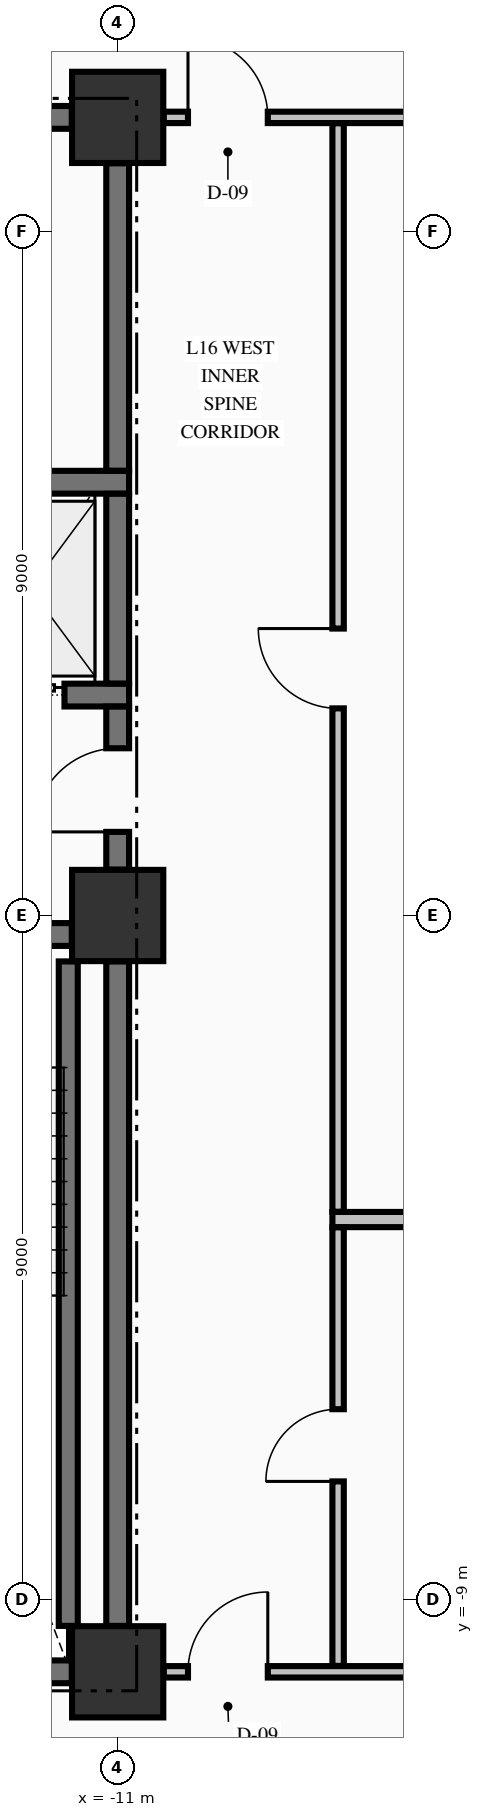
"""IFC4 building model, lengths in metres.
Left out: names, types, materials, properties, quantities, classifications, styles, units other than length and angle.
Written with IfcOpenShell. Run it as: python <this file> out.ifc"""

import sys

from ifc_helpers import new_model, si_unit, direction, frame, frame_2d, origin, origin_2d, place, context, subcontext, project, spatial, rectangle, extrude, element, fill, save


model = new_model("IFC4")
c1 = context("Model", 3, precision=1e-05, world=origin(), true_north=direction((0.0, 1.0)))
c2 = subcontext(c1, "Body", "Model", "MODEL_VIEW")
j1 = project(units=[si_unit("LENGTHUNIT", "METRE"), si_unit("PLANEANGLEUNIT", "RADIAN")], contexts=[c1])
p1 = place(None, origin())
s1 = spatial("IfcSite", under=j1, at=p1, CompositionType="ELEMENT")
p2 = place(p1, origin())
s2 = spatial("IfcBuilding", under=s1, at=p2, CompositionType="ELEMENT")
p3 = place(p2, frame((0.0, 0.0, 67.9)))
s3 = spatial("IfcBuildingStorey", under=s2, at=p3, CompositionType="ELEMENT", Elevation=67.9)
for number, where, z_axis, x_axis in (
    (1, (-11.0, -9.95, -0.25), (0.0, 0.0, 1.0), (1.0, 0.0, 0.0)),
    (2, (-11.0, 0.0, -0.25), (0.0, 0.0, 1.0), (1.0, 0.0, 0.0)),
    (3, (-11.0, 10.5, -0.25), (0.0, 0.0, 1.0), (1.0, 0.0, 0.0)),
):
    element("IfcColumn", number, at=place(p3, frame(where, z_axis=z_axis, x_axis=x_axis)), inside=s3, PredefinedType="COLUMN", context=c2, shape_type="SweptSolid", body=[
        extrude(rectangle(XDim=1.2, YDim=1.2, at=origin_2d()), origin(), (0.0, 0.0, 1.0), 3.495),
    ])
p4 = place(p3, frame((-14.7, -9.95, 0.0), z_axis=(0.0, 0.0, 1.0), x_axis=(1.0, 0.0, 0.0)))
e4 = element("IfcWall", 4, at=p4, inside=s3, PredefinedType="SHEAR", context=c2, shape_type="SweptSolid", body=[
    extrude(rectangle(XDim=3.096, YDim=0.3, at=frame_2d((1.548, 0.0))), origin(), (0.0, 0.0, 1.0), 3.245),
])
p5 = place(p3, frame((-19.396, -0.25, 0.0), z_axis=(0.0, 0.0, 1.0), x_axis=(1.0, 0.0, 0.0)))
e5 = element("IfcWall", 5, at=p5, inside=s3, PredefinedType="SHEAR", context=c2, shape_type="SweptSolid", body=[
    extrude(rectangle(XDim=7.792, YDim=0.3, at=frame_2d((3.896, 0.0))), origin(), (0.0, 0.0, 1.0), 3.245),
])
p6 = place(p5, frame((5.696, 0.0, 0.0)))
e6 = element("IfcOpeningElement", 6, at=p6, cuts=e5, PredefinedType="OPENING", context=c2, shape_type="SweptSolid", body=[
    extrude(rectangle(XDim=1.1, YDim=2.15, at=frame_2d((0.55, 1.075))), frame((0.0, 0.16, 0.0), z_axis=(0.0, -1.0, 0.0), x_axis=(1.0, 0.0, 0.0)), (0.0, 0.0, 1.0), 0.32),
])
p7 = place(p3, frame((-14.875, 2.9, 0.0), z_axis=(0.0, 0.0, 1.0), x_axis=(1.0, 0.0, 0.0)))
e7 = element("IfcWall", 7, at=p7, inside=s3, PredefinedType="SHEAR", context=c2, shape_type="SweptSolid", body=[
    extrude(rectangle(XDim=4.025, YDim=0.3, at=frame_2d((2.012, 0.0))), origin(), (0.0, 0.0, 1.0), 3.245),
])
p8 = place(p7, frame((2.075, 0.0, 0.0)))
e8 = element("IfcOpeningElement", 8, at=p8, cuts=e7, PredefinedType="OPENING", context=c2, shape_type="SweptSolid", body=[
    extrude(rectangle(XDim=1.1, YDim=2.2, at=frame_2d((0.55, 1.1))), frame((0.0, 0.16, 0.0), z_axis=(0.0, -1.0, 0.0), x_axis=(1.0, 0.0, 0.0)), (0.0, 0.0, 1.0), 0.32),
])
p9 = place(p3, frame((-14.875, 5.7, 0.0), z_axis=(0.0, 0.0, 1.0), x_axis=(1.0, 0.0, 0.0)))
e9 = element("IfcWall", 9, at=p9, inside=s3, PredefinedType="SHEAR", context=c2, shape_type="SweptSolid", body=[
    extrude(rectangle(XDim=4.025, YDim=0.3, at=frame_2d((2.012, 0.0))), origin(), (0.0, 0.0, 1.0), 3.245),
])
p10 = place(p3, frame((-14.7, 10.5, 0.0), z_axis=(0.0, 0.0, 1.0), x_axis=(1.0, 0.0, 0.0)))
e10 = element("IfcWall", 10, at=p10, inside=s3, PredefinedType="SHEAR", context=c2, shape_type="SweptSolid", body=[
    extrude(rectangle(XDim=3.096, YDim=0.3, at=frame_2d((1.548, 0.0))), origin(), (0.0, 0.0, 1.0), 3.245),
])
p11 = place(p10, frame((0.775, 0.0, 0.0)))
e11 = element("IfcOpeningElement", 11, at=p11, cuts=e10, PredefinedType="OPENING", context=c2, shape_type="SweptSolid", body=[
    extrude(rectangle(XDim=0.95, YDim=2.15, at=frame_2d((0.475, 1.075))), frame((0.0, 0.16, 0.0), z_axis=(0.0, -1.0, 0.0), x_axis=(1.0, 0.0, 0.0)), (0.0, 0.0, 1.0), 0.32),
])
p12 = place(p3, frame((-10.394, -9.95, 0.0), z_axis=(0.0, 0.0, 1.0), x_axis=(1.0, 0.0, 0.0)))
e12 = element("IfcWall", 12, at=p12, inside=s3, PredefinedType="PARTITIONING", context=c2, shape_type="SweptSolid", body=[
    extrude(rectangle(XDim=20.788, YDim=0.15, at=frame_2d((10.394, 0.0))), origin(), (0.0, 0.0, 1.0), 3.245),
])
p13 = place(p12, frame((0.319, 0.0, 0.0)))
e13 = element("IfcOpeningElement", 13, at=p13, cuts=e12, PredefinedType="OPENING", context=c2, shape_type="SweptSolid", body=[
    extrude(rectangle(XDim=1.05, YDim=2.15, at=frame_2d((0.525, 1.075))), frame((0.0, 0.085, 0.0), z_axis=(0.0, -1.0, 0.0), x_axis=(1.0, 0.0, 0.0)), (0.0, 0.0, 1.0), 0.17),
])
p14 = place(p12, frame((19.419, 0.0, 0.0)))
e14 = element("IfcOpeningElement", 14, at=p14, cuts=e12, PredefinedType="OPENING", context=c2, shape_type="SweptSolid", body=[
    extrude(rectangle(XDim=1.05, YDim=2.15, at=frame_2d((0.525, 1.075))), frame((0.0, 0.085, 0.0), z_axis=(0.0, -1.0, 0.0), x_axis=(1.0, 0.0, 0.0)), (0.0, 0.0, 1.0), 0.17),
])
p15 = place(p12, frame((13.369, 0.0, 0.0)))
e15 = element("IfcOpeningElement", 15, at=p15, cuts=e12, PredefinedType="OPENING", context=c2, shape_type="SweptSolid", body=[
    extrude(rectangle(XDim=0.95, YDim=2.15, at=frame_2d((0.475, 1.075))), frame((0.0, 0.085, 0.0), z_axis=(0.0, -1.0, 0.0), x_axis=(1.0, 0.0, 0.0)), (0.0, 0.0, 1.0), 0.17),
])
p16 = place(p3, frame((-8.175, -4.0, 0.0), z_axis=(0.0, 0.0, 1.0), x_axis=(1.0, 0.0, 0.0)))
e16 = element("IfcWall", 16, at=p16, inside=s3, PredefinedType="PARTITIONING", context=c2, shape_type="SweptSolid", body=[
    extrude(rectangle(XDim=10.075, YDim=0.2, at=frame_2d((5.038, 0.0))), origin(), (0.0, 0.0, 1.0), 3.245),
])
p17 = place(p3, frame((-10.394, 10.5, 0.0), z_axis=(0.0, 0.0, 1.0), x_axis=(1.0, 0.0, 0.0)))
e17 = element("IfcWall", 17, at=p17, inside=s3, PredefinedType="PARTITIONING", context=c2, shape_type="SweptSolid", body=[
    extrude(rectangle(XDim=20.788, YDim=0.15, at=frame_2d((10.394, 0.0))), origin(), (0.0, 0.0, 1.0), 3.245),
])
p18 = place(p17, frame((0.319, 0.0, 0.0)))
e18 = element("IfcOpeningElement", 18, at=p18, cuts=e17, PredefinedType="OPENING", context=c2, shape_type="SweptSolid", body=[
    extrude(rectangle(XDim=1.05, YDim=2.15, at=frame_2d((0.525, 1.075))), frame((0.0, 0.085, 0.0), z_axis=(0.0, -1.0, 0.0), x_axis=(1.0, 0.0, 0.0)), (0.0, 0.0, 1.0), 0.17),
])
p19 = place(p17, frame((19.419, 0.0, 0.0)))
e19 = element("IfcOpeningElement", 19, at=p19, cuts=e17, PredefinedType="OPENING", context=c2, shape_type="SweptSolid", body=[
    extrude(rectangle(XDim=1.05, YDim=2.15, at=frame_2d((0.525, 1.075))), frame((0.0, 0.085, 0.0), z_axis=(0.0, -1.0, 0.0), x_axis=(1.0, 0.0, 0.0)), (0.0, 0.0, 1.0), 0.17),
])
p20 = place(p3, frame((-11.65, -9.346, 0.0), z_axis=(0.0, 0.0, 1.0), x_axis=(0.0, 1.0, 0.0)))
e20 = element("IfcWall", 20, at=p20, inside=s3, PredefinedType="SOLIDWALL", context=c2, shape_type="SweptSolid", body=[
    extrude(rectangle(XDim=8.742, YDim=0.25, at=frame_2d((4.371, 0.0))), origin(), (0.0, 0.0, 1.0), 3.245),
])
p21 = place(p3, frame((-11.0, -9.346, 0.0), z_axis=(0.0, 0.0, 1.0), x_axis=(0.0, 1.0, 0.0)))
e21 = element("IfcWall", 21, at=p21, inside=s3, PredefinedType="SHEAR", context=c2, shape_type="SweptSolid", body=[
    extrude(rectangle(XDim=8.742, YDim=0.3, at=frame_2d((4.371, 0.0))), origin(), (0.0, 0.0, 1.0), 3.245),
])
p22 = place(p3, frame((-11.0, 0.604, 0.0), z_axis=(0.0, 0.0, 1.0), x_axis=(0.0, 1.0, 0.0)))
e22 = element("IfcWall", 22, at=p22, inside=s3, PredefinedType="SHEAR", context=c2, shape_type="SweptSolid", body=[
    extrude(rectangle(XDim=2.144, YDim=0.3, at=frame_2d((1.072, 0.0))), origin(), (0.0, 0.0, 1.0), 3.245),
])
p23 = place(p22, frame((0.496, 0.0, 0.0)))
e23 = element("IfcOpeningElement", 23, at=p23, cuts=e22, PredefinedType="OPENING", context=c2, shape_type="SweptSolid", body=[
    extrude(rectangle(XDim=1.1, YDim=2.15, at=frame_2d((0.55, 1.075))), frame((0.0, 0.16, 0.0), z_axis=(0.0, -1.0, 0.0), x_axis=(1.0, 0.0, 0.0)), (0.0, 0.0, 1.0), 0.32),
])
p24 = place(p3, frame((-11.0, 3.052, 0.0), z_axis=(0.0, 0.0, 1.0), x_axis=(0.0, 1.0, 0.0)))
e24 = element("IfcWall", 24, at=p24, inside=s3, PredefinedType="SHEAR", context=c2, shape_type="SweptSolid", body=[
    extrude(rectangle(XDim=2.496, YDim=0.3, at=frame_2d((1.248, 0.0))), origin(), (0.0, 0.0, 1.0), 3.245),
])
p25 = place(p3, frame((-11.0, 5.852, 0.0), z_axis=(0.0, 0.0, 1.0), x_axis=(0.0, 1.0, 0.0)))
e25 = element("IfcWall", 25, at=p25, inside=s3, PredefinedType="SHEAR", context=c2, shape_type="SweptSolid", body=[
    extrude(rectangle(XDim=4.044, YDim=0.3, at=frame_2d((2.022, 0.0))), origin(), (0.0, 0.0, 1.0), 3.245),
])
p26 = place(p3, frame((-8.1, -9.872, 0.0), z_axis=(0.0, 0.0, 1.0), x_axis=(0.0, 1.0, 0.0)))
e26 = element("IfcWall", 26, at=p26, inside=s3, PredefinedType="PARTITIONING", context=c2, shape_type="SweptSolid", body=[
    extrude(rectangle(XDim=5.769, YDim=0.15, at=frame_2d((2.885, 0.0))), origin(), (0.0, 0.0, 1.0), 3.245),
])
p27 = place(p26, frame((2.427, 0.0, 0.0)))
e27 = element("IfcOpeningElement", 27, at=p27, cuts=e26, PredefinedType="OPENING", context=c2, shape_type="SweptSolid", body=[
    extrude(rectangle(XDim=0.95, YDim=2.15, at=frame_2d((0.475, 1.075))), frame((0.0, 0.085, 0.0), z_axis=(0.0, -1.0, 0.0), x_axis=(1.0, 0.0, 0.0)), (0.0, 0.0, 1.0), 0.17),
])
p28 = place(p3, frame((-8.1, -3.897, 0.0), z_axis=(0.0, 0.0, 1.0), x_axis=(0.0, 1.0, 0.0)))
e28 = element("IfcWall", 28, at=p28, inside=s3, PredefinedType="PARTITIONING", context=c2, shape_type="SweptSolid", body=[
    extrude(rectangle(XDim=14.319, YDim=0.15, at=frame_2d((7.16, 0.0))), origin(), (0.0, 0.0, 1.0), 3.245),
])
p29 = place(p28, frame((6.622, 0.0, 0.0)))
e29 = element("IfcOpeningElement", 29, at=p29, cuts=e28, PredefinedType="OPENING", context=c2, shape_type="SweptSolid", body=[
    extrude(rectangle(XDim=1.05, YDim=2.15, at=frame_2d((0.525, 1.075))), frame((0.0, 0.085, 0.0), z_axis=(0.0, -1.0, 0.0), x_axis=(1.0, 0.0, 0.0)), (0.0, 0.0, 1.0), 0.17),
])
p30 = place(p23, origin())
e30 = element("IfcDoor", 30, at=p30, inside=s3, OperationType="SINGLE_SWING_LEFT", PredefinedType="DOOR", context=c2, shape_type="SweptSolid", body=[
    extrude(rectangle(XDim=1.1, YDim=2.15, at=frame_2d((0.55, 1.075))), frame((0.0, 0.025, 0.0), z_axis=(0.0, -1.0, 0.0), x_axis=(1.0, 0.0, 0.0)), (0.0, 0.0, 1.0), 0.05),
])
fill(e23, e30)
p31 = place(p8, origin())
e31 = element("IfcDoor", 31, at=p31, inside=s3, OperationType="SLIDING_TO_LEFT", PredefinedType="DOOR", context=c2, shape_type="SweptSolid", body=[
    extrude(rectangle(XDim=1.1, YDim=2.2, at=frame_2d((0.55, 1.1))), frame((0.0, 0.025, 0.0), z_axis=(0.0, -1.0, 0.0), x_axis=(1.0, 0.0, 0.0)), (0.0, 0.0, 1.0), 0.05),
])
fill(e8, e31)
p32 = place(p18, origin())
e32 = element("IfcDoor", 32, at=p32, inside=s3, OperationType="SINGLE_SWING_LEFT", PredefinedType="DOOR", context=c2, shape_type="SweptSolid", body=[
    extrude(rectangle(XDim=1.05, YDim=2.15, at=frame_2d((0.525, 1.075))), frame((0.0, 0.025, 0.0), z_axis=(0.0, -1.0, 0.0), x_axis=(1.0, 0.0, 0.0)), (0.0, 0.0, 1.0), 0.05),
])
fill(e18, e32)
p33 = place(p13, origin())
e33 = element("IfcDoor", 33, at=p33, inside=s3, OperationType="SINGLE_SWING_RIGHT", PredefinedType="DOOR", context=c2, shape_type="SweptSolid", body=[
    extrude(rectangle(XDim=1.05, YDim=2.15, at=frame_2d((0.525, 1.075))), frame((0.0, 0.025, 0.0), z_axis=(0.0, -1.0, 0.0), x_axis=(1.0, 0.0, 0.0)), (0.0, 0.0, 1.0), 0.05),
])
fill(e13, e33)
p34 = place(p29, origin())
e34 = element("IfcDoor", 34, at=p34, inside=s3, OperationType="SINGLE_SWING_RIGHT", PredefinedType="DOOR", context=c2, shape_type="SweptSolid", body=[
    extrude(rectangle(XDim=1.05, YDim=2.15, at=frame_2d((0.525, 1.075))), frame((0.0, 0.025, 0.0), z_axis=(0.0, -1.0, 0.0), x_axis=(1.0, 0.0, 0.0)), (0.0, 0.0, 1.0), 0.05),
])
fill(e29, e34)
p35 = place(p27, origin())
e35 = element("IfcDoor", 35, at=p35, inside=s3, OperationType="SINGLE_SWING_LEFT", PredefinedType="DOOR", context=c2, shape_type="SweptSolid", body=[
    extrude(rectangle(XDim=0.95, YDim=2.15, at=frame_2d((0.475, 1.075))), frame((0.0, 0.025, 0.0), z_axis=(0.0, -1.0, 0.0), x_axis=(1.0, 0.0, 0.0)), (0.0, 0.0, 1.0), 0.05),
])
fill(e27, e35)
save(model, sys.argv[1])
